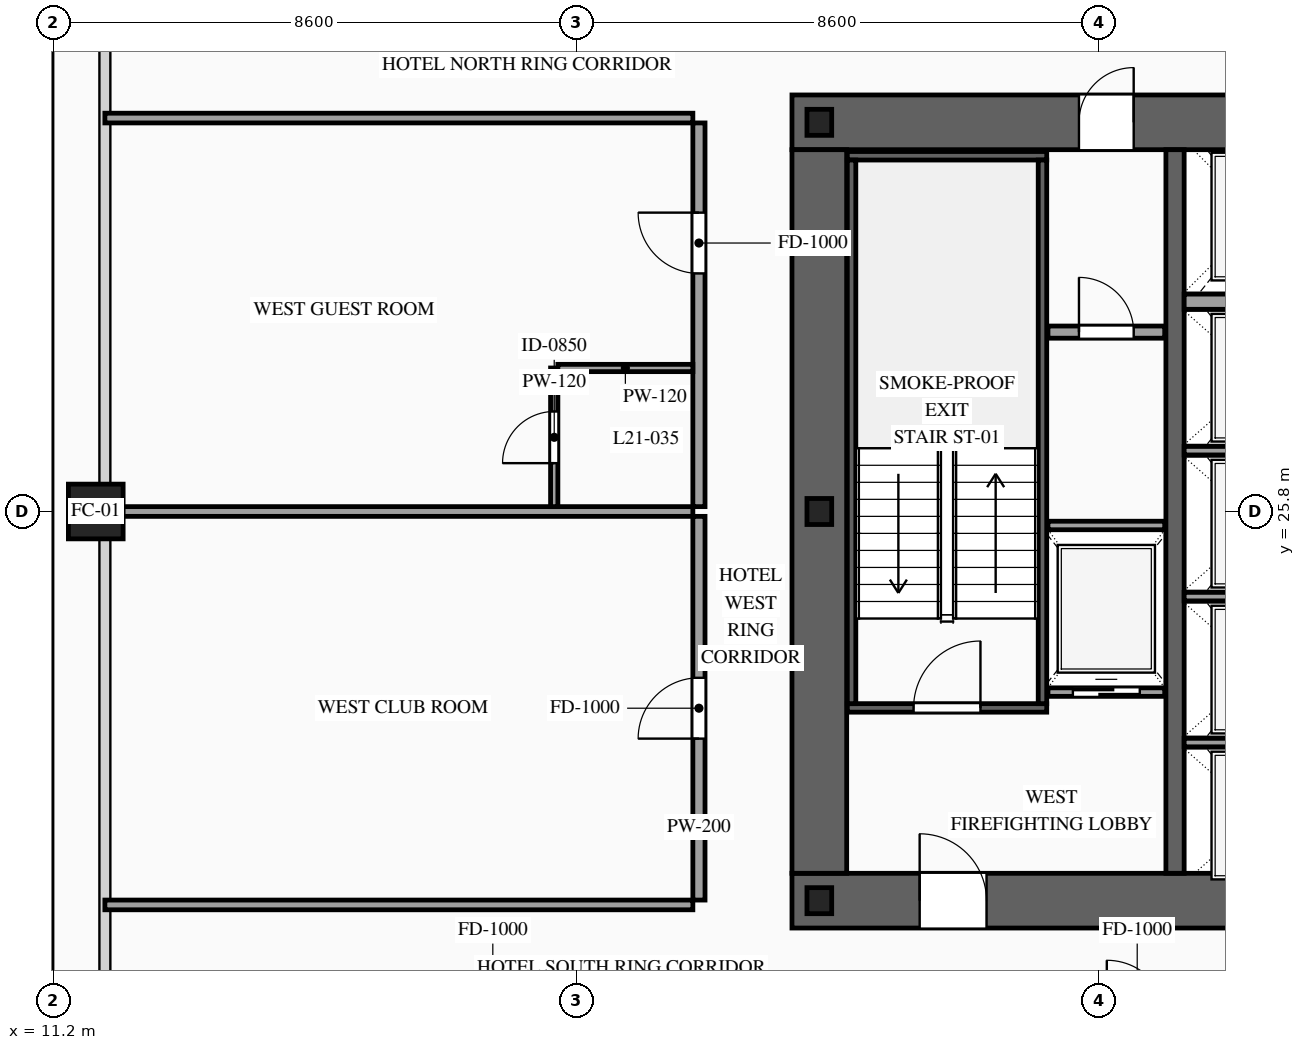
"""IFC4 building model, lengths in metres.
Left out: names, types, materials, properties, quantities, classifications, styles, units other than length and angle.
Written with IfcOpenShell. Run it as: python <this file> out.ifc"""

import sys

from ifc_helpers import new_model, si_unit, direction, frame, frame_2d, origin, origin_2d, place, context, subcontext, project, spatial, rectangle, hollow_rectangle, i_section, extrude, source, transform, mapped, element, fill, save


model = new_model("IFC4")
c1 = context("Model", 3, precision=1e-05, world=origin(), true_north=direction((0.0, 1.0)))
c2 = subcontext(c1, "Body", "Model", "MODEL_VIEW")
j1 = project(units=[si_unit("LENGTHUNIT", "METRE"), si_unit("PLANEANGLEUNIT", "RADIAN")], contexts=[c1])
p1 = place(None, origin())
s1 = spatial("IfcSite", under=j1, at=p1, CompositionType="ELEMENT")
p2 = place(p1, origin())
s2 = spatial("IfcBuilding", under=s1, at=p2, CompositionType="ELEMENT")
p3 = place(p2, frame((0.0, 0.0, 82.0)))
s3 = spatial("IfcBuildingStorey", under=s2, at=p3, CompositionType="ELEMENT", Elevation=82.0)
p4 = place(p3, frame((23.35, 19.4, 0.0), z_axis=(0.0, 0.0, 1.0), x_axis=(1.0, 0.0, 0.0)))
e1 = element("IfcWall", 1, at=p4, inside=s3, PredefinedType="SHEAR", context=c2, shape_type="SweptSolid", body=[
    extrude(rectangle(XDim=27.3, YDim=0.9, at=frame_2d((13.65, 0.0))), origin(), (0.0, 0.0, 1.0), 3.6),
])
p5 = place(p4, frame((2.1, 0.0, 0.0)))
e2 = element("IfcOpeningElement", 2, at=p5, cuts=e1, PredefinedType="OPENING", context=c2, shape_type="SweptSolid", body=[
    extrude(rectangle(XDim=1.1, YDim=2.2, at=frame_2d((0.55, 1.1))), frame((0.0, 0.465, 0.0), z_axis=(0.0, -1.0, 0.0), x_axis=(1.0, 0.0, 0.0)), (0.0, 0.0, 1.0), 0.93),
])
p6 = place(p4, frame((10.0, 0.0, 0.0)))
e3 = element("IfcOpeningElement", 3, at=p6, cuts=e1, PredefinedType="OPENING", context=c2, shape_type="SweptSolid", body=[
    extrude(rectangle(XDim=1.1, YDim=2.2, at=frame_2d((0.55, 1.1))), frame((0.0, 0.465, 0.0), z_axis=(0.0, -1.0, 0.0), x_axis=(1.0, 0.0, 0.0)), (0.0, 0.0, 1.0), 0.93),
])
p7 = place(p4, frame((23.2, 0.0, 0.0)))
e4 = element("IfcOpeningElement", 4, at=p7, cuts=e1, PredefinedType="OPENING", context=c2, shape_type="SweptSolid", body=[
    extrude(rectangle(XDim=1.1, YDim=2.2, at=frame_2d((0.55, 1.1))), frame((0.0, 0.465, 0.0), z_axis=(0.0, -1.0, 0.0), x_axis=(1.0, 0.0, 0.0)), (0.0, 0.0, 1.0), 0.93),
])
p8 = place(p4, frame((19.82, 0.0, 0.0)))
e5 = element("IfcOpeningElement", 5, at=p8, cuts=e1, PredefinedType="OPENING", context=c2, shape_type="SweptSolid", body=[
    extrude(rectangle(XDim=0.9, YDim=2.15, at=frame_2d((0.45, 1.075))), frame((0.0, 0.465, 0.0), z_axis=(0.0, -1.0, 0.0), x_axis=(1.0, 0.0, 0.0)), (0.0, 0.0, 1.0), 0.93),
])
p9 = place(p4, frame((18.38, 0.0, 0.0)))
e6 = element("IfcOpeningElement", 6, at=p9, cuts=e1, PredefinedType="OPENING", context=c2, shape_type="SweptSolid", body=[
    extrude(rectangle(XDim=0.9, YDim=2.15, at=frame_2d((0.45, 1.075))), frame((0.0, 0.465, 0.0), z_axis=(0.0, -1.0, 0.0), x_axis=(1.0, 0.0, 0.0)), (0.0, 0.0, 1.0), 0.93),
])
p10 = place(p3, frame((23.35, 32.2, 0.0), z_axis=(0.0, 0.0, 1.0), x_axis=(1.0, 0.0, 0.0)))
e7 = element("IfcWall", 7, at=p10, inside=s3, PredefinedType="SHEAR", context=c2, shape_type="SweptSolid", body=[
    extrude(rectangle(XDim=27.3, YDim=0.9, at=frame_2d((13.65, 0.0))), origin(), (0.0, 0.0, 1.0), 3.6),
])
p11 = place(p10, frame((4.72, 0.0, 0.0)))
e8 = element("IfcOpeningElement", 8, at=p11, cuts=e7, PredefinedType="OPENING", context=c2, shape_type="SweptSolid", body=[
    extrude(rectangle(XDim=0.9, YDim=2.15, at=frame_2d((0.45, 1.075))), frame((0.0, 0.465, 0.0), z_axis=(0.0, -1.0, 0.0), x_axis=(1.0, 0.0, 0.0)), (0.0, 0.0, 1.0), 0.93),
])
p12 = place(p10, frame((10.0, 0.0, 0.0)))
e9 = element("IfcOpeningElement", 9, at=p12, cuts=e7, PredefinedType="OPENING", context=c2, shape_type="SweptSolid", body=[
    extrude(rectangle(XDim=1.1, YDim=2.2, at=frame_2d((0.55, 1.1))), frame((0.0, 0.465, 0.0), z_axis=(0.0, -1.0, 0.0), x_axis=(1.0, 0.0, 0.0)), (0.0, 0.0, 1.0), 0.93),
])
p13 = place(p10, frame((15.85, 0.0, 0.0)))
e10 = element("IfcOpeningElement", 10, at=p13, cuts=e7, PredefinedType="OPENING", context=c2, shape_type="SweptSolid", body=[
    extrude(rectangle(XDim=1.1, YDim=2.2, at=frame_2d((0.55, 1.1))), frame((0.0, 0.465, 0.0), z_axis=(0.0, -1.0, 0.0), x_axis=(1.0, 0.0, 0.0)), (0.0, 0.0, 1.0), 0.93),
])
m1 = source(origin(), c2, "Body", "SweptSolid", [
    extrude(rectangle(XDim=11.9, YDim=0.9, at=frame_2d((5.95, 0.0))), origin(), (0.0, 0.0, 1.0), 3.6),
])
p14 = place(p3, frame((23.8, 19.85, 0.0), z_axis=(0.0, 0.0, 1.0), x_axis=(0.0, 1.0, 0.0)))
e11 = element("IfcWall", 11, at=p14, inside=s3, PredefinedType="SHEAR", context=c2, shape_type="MappedRepresentation", body=[
    mapped(m1, transform((0.0, 0.0, 0.0), scale=1.0)),
])
m2 = source(origin(), c2, "Body", "SweptSolid", [
    extrude(rectangle(XDim=11.9, YDim=0.3, at=frame_2d((5.95, 0.0))), origin(), (0.0, 0.0, 1.0), 3.6),
])
p15 = place(p3, frame((29.65, 19.85, 0.0), z_axis=(0.0, 0.0, 1.0), x_axis=(0.0, 1.0, 0.0)))
e12 = element("IfcWall", 12, at=p15, inside=s3, PredefinedType="SOLIDWALL", context=c2, shape_type="MappedRepresentation", body=[
    mapped(m2, transform((0.0, 0.0, 0.0), scale=1.0)),
])
m3 = source(origin(), c2, "Body", "SweptSolid", [
    extrude(i_section(OverallWidth=0.407, OverallDepth=0.428, WebThickness=0.02, FlangeThickness=0.035, at=origin_2d()), origin(), (0.0, 0.0, 1.0), 3.6),
])
for number, where, z_axis, x_axis in (
    (13, (23.8, 19.4, 0.0), (0.0, 0.0, 1.0), (1.0, 0.0, 0.0)),
    (14, (23.8, 25.8, 0.0), (0.0, 0.0, 1.0), (1.0, 0.0, 0.0)),
    (15, (23.8, 32.2, 0.0), (0.0, 0.0, 1.0), (1.0, 0.0, 0.0)),
):
    element("IfcColumn", number, at=place(p3, frame(where, z_axis=z_axis, x_axis=x_axis)), inside=s3, PredefinedType="COLUMN", context=c2, shape_type="MappedRepresentation", body=[
        mapped(m3, transform((0.0, 0.0, 0.0), scale=1.0)),
    ])
m4 = source(origin(), c2, "Body", "SweptSolid", [
    extrude(hollow_rectangle(XDim=0.9, YDim=0.9, WallThickness=0.042, at=origin_2d()), origin(), (0.0, 0.0, 1.0), 3.32),
])
p16 = place(p3, frame((11.9, 25.8, 0.0), z_axis=(0.0, 0.0, 1.0), x_axis=(1.0, 0.0, 0.0)))
e16 = element("IfcColumn", 16, at=p16, inside=s3, PredefinedType="COLUMN", context=c2, shape_type="MappedRepresentation", body=[
    mapped(m4, transform((0.0, 0.0, 0.0), scale=1.0)),
])
p17 = place(p3, frame((27.56, 22.83, 0.0), z_axis=(0.0, 0.0, 1.0), x_axis=(1.0, 0.0, 0.0)))
e17 = element("IfcWall", 17, at=p17, inside=s3, PredefinedType="SOLIDWALL", context=c2, shape_type="SweptSolid", body=[
    extrude(rectangle(XDim=1.92, YDim=0.14, at=frame_2d((0.96, 0.0))), origin(), (0.0, 0.0, 1.0), 3.32),
])
p18 = place(p17, frame((0.41, 0.0, 0.0)))
e18 = element("IfcOpeningElement", 18, at=p18, cuts=e17, PredefinedType="OPENING", context=c2, shape_type="SweptSolid", body=[
    extrude(rectangle(XDim=1.1, YDim=2.2, at=frame_2d((0.55, 1.1))), frame((0.0, 0.085, 0.0), z_axis=(0.0, -1.0, 0.0), x_axis=(1.0, 0.0, 0.0)), (0.0, 0.0, 1.0), 0.17),
])
m5 = source(origin(), c2, "Body", "SweptSolid", [
    extrude(rectangle(XDim=1.92, YDim=0.14, at=frame_2d((0.96, 0.0))), origin(), (0.0, 0.0, 1.0), 3.32),
])
p19 = place(p3, frame((27.56, 25.57, 0.0), z_axis=(0.0, 0.0, 1.0), x_axis=(1.0, 0.0, 0.0)))
e19 = element("IfcWall", 19, at=p19, inside=s3, PredefinedType="SOLIDWALL", context=c2, shape_type="MappedRepresentation", body=[
    mapped(m5, transform((0.0, 0.0, 0.0), scale=1.0)),
])
m6 = source(origin(), c2, "Body", "SweptSolid", [
    extrude(rectangle(XDim=2.5, YDim=0.14, at=frame_2d((1.25, 0.0))), origin(), (0.0, 0.0, 1.0), 3.32),
])
for number, where, z_axis, x_axis in (
    (20, (29.8, 22.0, 0.0), (0.0, 0.0, 1.0), (1.0, 0.0, 0.0)),
    (21, (29.8, 24.4, 0.0), (0.0, 0.0, 1.0), (1.0, 0.0, 0.0)),
    (22, (29.8, 26.8, 0.0), (0.0, 0.0, 1.0), (1.0, 0.0, 0.0)),
):
    element("IfcWall", number, at=place(p3, frame(where, z_axis=z_axis, x_axis=x_axis)), inside=s3, PredefinedType="SOLIDWALL", context=c2, shape_type="MappedRepresentation", body=[
        mapped(m6, transform((0.0, 0.0, 0.0), scale=1.0)),
    ])
m7 = source(origin(), c2, "Body", "SweptSolid", [
    extrude(rectangle(XDim=2.5, YDim=0.25, at=frame_2d((1.25, 0.0))), origin(), (0.0, 0.0, 1.0), 3.32),
])
p20 = place(p3, frame((29.8, 29.25, 0.0), z_axis=(0.0, 0.0, 1.0), x_axis=(1.0, 0.0, 0.0)))
e23 = element("IfcWall", 23, at=p20, inside=s3, PredefinedType="SOLIDWALL", context=c2, shape_type="MappedRepresentation", body=[
    mapped(m7, transform((0.0, 0.0, 0.0), scale=1.0)),
])
p21 = place(p3, frame((24.26, 22.57, 0.0), z_axis=(0.0, 0.0, 1.0), x_axis=(1.0, 0.0, 0.0)))
e24 = element("IfcWall", 24, at=p21, inside=s3, PredefinedType="SOLIDWALL", context=c2, shape_type="SweptSolid", body=[
    extrude(rectangle(XDim=3.28, YDim=0.14, at=frame_2d((1.64, 0.0))), origin(), (0.0, 0.0, 1.0), 3.32),
])
p22 = place(p21, frame((1.09, 0.0, 0.0)))
e25 = element("IfcOpeningElement", 25, at=p22, cuts=e24, PredefinedType="OPENING", context=c2, shape_type="SweptSolid", body=[
    extrude(rectangle(XDim=1.1, YDim=2.2, at=frame_2d((0.55, 1.1))), frame((0.0, 0.085, 0.0), z_axis=(0.0, -1.0, 0.0), x_axis=(1.0, 0.0, 0.0)), (0.0, 0.0, 1.0), 0.17),
])
m8 = source(origin(), c2, "Body", "SweptSolid", [
    extrude(rectangle(XDim=3.28, YDim=0.14, at=frame_2d((1.64, 0.0))), origin(), (0.0, 0.0, 1.0), 3.32),
])
p23 = place(p3, frame((24.26, 31.65, 0.0), z_axis=(0.0, 0.0, 1.0), x_axis=(1.0, 0.0, 0.0)))
e26 = element("IfcWall", 26, at=p23, inside=s3, PredefinedType="SOLIDWALL", context=c2, shape_type="MappedRepresentation", body=[
    mapped(m8, transform((0.0, 0.0, 0.0), scale=1.0)),
])
m9 = source(origin(), c2, "Body", "SweptSolid", [
    extrude(rectangle(XDim=8.94, YDim=0.14, at=frame_2d((4.47, 0.0))), origin(), (0.0, 0.0, 1.0), 3.32),
])
for number, where, z_axis, x_axis in (
    (27, (24.33, 22.64, 0.0), (0.0, 0.0, 1.0), (0.0, 1.0, 0.0)),
    (28, (27.47, 22.64, 0.0), (0.0, 0.0, 1.0), (0.0, 1.0, 0.0)),
):
    element("IfcWall", number, at=place(p3, frame(where, z_axis=z_axis, x_axis=x_axis)), inside=s3, PredefinedType="SOLIDWALL", context=c2, shape_type="MappedRepresentation", body=[
        mapped(m9, transform((0.0, 0.0, 0.0), scale=1.0)),
    ])
p24 = place(p3, frame((27.56, 28.75, 0.0), z_axis=(0.0, 0.0, 1.0), x_axis=(1.0, 0.0, 0.0)))
e29 = element("IfcWall", 29, at=p24, inside=s3, PredefinedType="PARTITIONING", context=c2, shape_type="SweptSolid", body=[
    extrude(rectangle(XDim=1.92, YDim=0.2, at=frame_2d((0.96, 0.0))), origin(), (0.0, 0.0, 1.0), 3.32),
])
p25 = place(p24, frame((0.51, 0.0, 0.0)))
e30 = element("IfcOpeningElement", 30, at=p25, cuts=e29, PredefinedType="OPENING", context=c2, shape_type="SweptSolid", body=[
    extrude(rectangle(XDim=0.9, YDim=2.15, at=frame_2d((0.45, 1.075))), frame((0.0, 0.115, 0.0), z_axis=(0.0, -1.0, 0.0), x_axis=(1.0, 0.0, 0.0)), (0.0, 0.0, 1.0), 0.23),
])
p26 = place(p3, frame((21.82, 19.41, 0.0), z_axis=(0.0, 0.0, 1.0), x_axis=(0.0, 1.0, 0.0)))
e31 = element("IfcWall", 31, at=p26, inside=s3, PredefinedType="PARTITIONING", context=c2, shape_type="SweptSolid", body=[
    extrude(rectangle(XDim=6.31, YDim=0.2, at=frame_2d((3.155, 0.0))), origin(), (0.0, 0.0, 1.0), 3.32),
])
p27 = place(p26, frame((2.655, 0.0, 0.0)))
e32 = element("IfcOpeningElement", 32, at=p27, cuts=e31, PredefinedType="OPENING", context=c2, shape_type="SweptSolid", body=[
    extrude(rectangle(XDim=1.0, YDim=2.2, at=frame_2d((0.5, 1.1))), frame((0.0, 0.115, 0.0), z_axis=(0.0, -1.0, 0.0), x_axis=(1.0, 0.0, 0.0)), (0.0, 0.0, 1.0), 0.23),
])
m10 = source(origin(), c2, "Body", "SweptSolid", [
    extrude(rectangle(XDim=9.67, YDim=0.16, at=frame_2d((4.835, 0.0))), origin(), (0.0, 0.0, 1.0), 1.715),
])
p28 = place(p3, frame((12.05, 25.8, 0.0), z_axis=(0.0, 0.0, 1.0), x_axis=(1.0, 0.0, 0.0)))
e33 = element("IfcWall", 33, at=p28, inside=s3, PredefinedType="PARTITIONING", context=c2, shape_type="MappedRepresentation", body=[
    mapped(m10, transform((0.0, 0.0, 0.0), scale=1.0)),
])
m11 = source(origin(), c2, "Body", "SweptSolid", [
    extrude(rectangle(XDim=9.67, YDim=0.16, at=frame_2d((4.835, 0.0))), origin(), (0.0, 0.0, 1.0), 3.32),
])
p29 = place(p3, frame((12.05, 19.33, 0.0), z_axis=(0.0, 0.0, 1.0), x_axis=(1.0, 0.0, 0.0)))
e34 = element("IfcWall", 34, at=p29, inside=s3, PredefinedType="PARTITIONING", context=c2, shape_type="MappedRepresentation", body=[
    mapped(m11, transform((0.0, 0.0, 0.0), scale=1.0)),
])
p30 = place(p3, frame((21.82, 25.88, 0.0), z_axis=(0.0, 0.0, 1.0), x_axis=(0.0, 1.0, 0.0)))
e35 = element("IfcWall", 35, at=p30, inside=s3, PredefinedType="PARTITIONING", context=c2, shape_type="SweptSolid", body=[
    extrude(rectangle(XDim=6.31, YDim=0.2, at=frame_2d((3.155, 0.0))), origin(), (0.0, 0.0, 1.0), 3.32),
])
p31 = place(p30, frame((3.835, 0.0, 0.0)))
e36 = element("IfcOpeningElement", 36, at=p31, cuts=e35, PredefinedType="OPENING", context=c2, shape_type="SweptSolid", body=[
    extrude(rectangle(XDim=1.0, YDim=2.2, at=frame_2d((0.5, 1.1))), frame((0.0, 0.115, 0.0), z_axis=(0.0, -1.0, 0.0), x_axis=(1.0, 0.0, 0.0)), (0.0, 0.0, 1.0), 0.23),
])
p32 = place(p3, frame((12.05, 32.27, 0.0), z_axis=(0.0, 0.0, 1.0), x_axis=(1.0, 0.0, 0.0)))
e37 = element("IfcWall", 37, at=p32, inside=s3, PredefinedType="PARTITIONING", context=c2, shape_type="MappedRepresentation", body=[
    mapped(m11, transform((0.0, 0.0, 0.0), scale=1.0)),
])
p33 = place(p3, frame((19.44, 25.88, 0.0), z_axis=(0.0, 0.0, 1.0), x_axis=(0.0, 1.0, 0.0)))
e38 = element("IfcWall", 38, at=p33, inside=s3, PredefinedType="PARTITIONING", context=c2, shape_type="SweptSolid", body=[
    extrude(rectangle(XDim=2.28, YDim=0.12, at=frame_2d((1.14, 0.0))), origin(), (0.0, 0.0, 1.0), 3.32),
])
p34 = place(p33, frame((0.715, 0.0, 0.0)))
e39 = element("IfcOpeningElement", 39, at=p34, cuts=e38, PredefinedType="OPENING", context=c2, shape_type="SweptSolid", body=[
    extrude(rectangle(XDim=0.85, YDim=2.1, at=frame_2d((0.425, 1.05))), frame((0.0, 0.075, 0.0), z_axis=(0.0, -1.0, 0.0), x_axis=(1.0, 0.0, 0.0)), (0.0, 0.0, 1.0), 0.15),
])
m12 = source(origin(), c2, "Body", "SweptSolid", [
    extrude(rectangle(XDim=2.22, YDim=0.12, at=frame_2d((1.11, 0.0))), origin(), (0.0, 0.0, 1.0), 3.32),
])
p35 = place(p3, frame((19.5, 28.16, 0.0), z_axis=(0.0, 0.0, 1.0), x_axis=(1.0, 0.0, 0.0)))
e40 = element("IfcWall", 40, at=p35, inside=s3, PredefinedType="PARTITIONING", context=c2, shape_type="MappedRepresentation", body=[
    mapped(m12, transform((0.0, 0.0, 0.0), scale=1.0)),
])
m13 = source(origin(), c2, "Body", "SweptSolid", [
    extrude(rectangle(XDim=1.1, YDim=2.2, at=frame_2d((0.55, 1.1))), frame((0.0, 0.025, 0.0), z_axis=(0.0, -1.0, 0.0), x_axis=(1.0, 0.0, 0.0)), (0.0, 0.0, 1.0), 0.05),
])
p36 = place(p18, origin())
e41 = element("IfcDoor", 41, at=p36, inside=s3, OperationType="SLIDING_TO_LEFT", PredefinedType="DOOR", context=c2, shape_type="MappedRepresentation", body=[
    mapped(m13, transform((0.0, 0.0, 0.0), scale=1.0)),
])
fill(e18, e41)
m14 = source(origin(), c2, "Body", "SweptSolid", [
    extrude(rectangle(XDim=1.1, YDim=2.2, at=frame_2d((0.55, 1.1))), frame((0.0, 0.025, 0.0), z_axis=(0.0, -1.0, 0.0), x_axis=(1.0, 0.0, 0.0)), (0.0, 0.0, 1.0), 0.05),
])
p37 = place(p22, origin())
e42 = element("IfcDoor", 42, at=p37, inside=s3, OperationType="SINGLE_SWING_RIGHT", PredefinedType="DOOR", context=c2, shape_type="MappedRepresentation", body=[
    mapped(m14, transform((0.0, 0.0, 0.0), scale=1.0)),
])
fill(e25, e42)
p38 = place(p5, origin())
e43 = element("IfcDoor", 43, at=p38, inside=s3, OperationType="SINGLE_SWING_LEFT", PredefinedType="DOOR", context=c2, shape_type="MappedRepresentation", body=[
    mapped(m14, transform((0.0, 0.0, 0.0), scale=1.0)),
])
fill(e2, e43)
m15 = source(origin(), c2, "Body", "SweptSolid", [
    extrude(rectangle(XDim=0.9, YDim=2.15, at=frame_2d((0.45, 1.075))), frame((0.0, 0.025, 0.0), z_axis=(0.0, -1.0, 0.0), x_axis=(1.0, 0.0, 0.0)), (0.0, 0.0, 1.0), 0.05),
])
p39 = place(p11, origin())
e44 = element("IfcDoor", 44, at=p39, inside=s3, OperationType="SINGLE_SWING_RIGHT", PredefinedType="DOOR", context=c2, shape_type="MappedRepresentation", body=[
    mapped(m15, transform((0.0, 0.0, 0.0), scale=1.0)),
])
fill(e8, e44)
p40 = place(p25, origin())
e45 = element("IfcDoor", 45, at=p40, inside=s3, OperationType="SINGLE_SWING_LEFT", PredefinedType="DOOR", context=c2, shape_type="MappedRepresentation", body=[
    mapped(m15, transform((0.0, 0.0, 0.0), scale=1.0)),
])
fill(e30, e45)
m16 = source(origin(), c2, "Body", "SweptSolid", [
    extrude(rectangle(XDim=1.0, YDim=2.2, at=frame_2d((0.5, 1.1))), frame((0.0, 0.025, 0.0), z_axis=(0.0, -1.0, 0.0), x_axis=(1.0, 0.0, 0.0)), (0.0, 0.0, 1.0), 0.05),
])
p41 = place(p27, origin())
e46 = element("IfcDoor", 46, at=p41, inside=s3, OperationType="SINGLE_SWING_LEFT", PredefinedType="DOOR", context=c2, shape_type="MappedRepresentation", body=[
    mapped(m16, transform((0.0, 0.0, 0.0), scale=1.0)),
])
fill(e32, e46)
p42 = place(p31, origin())
e47 = element("IfcDoor", 47, at=p42, inside=s3, OperationType="SINGLE_SWING_RIGHT", PredefinedType="DOOR", context=c2, shape_type="MappedRepresentation", body=[
    mapped(m16, transform((0.0, 0.0, 0.0), scale=1.0)),
])
fill(e36, e47)
m17 = source(origin(), c2, "Body", "SweptSolid", [
    extrude(rectangle(XDim=0.85, YDim=2.1, at=frame_2d((0.425, 1.05))), frame((0.0, 0.025, 0.0), z_axis=(0.0, -1.0, 0.0), x_axis=(1.0, 0.0, 0.0)), (0.0, 0.0, 1.0), 0.05),
])
p43 = place(p34, origin())
e48 = element("IfcDoor", 48, at=p43, inside=s3, OperationType="SINGLE_SWING_LEFT", PredefinedType="DOOR", context=c2, shape_type="MappedRepresentation", body=[
    mapped(m17, transform((0.0, 0.0, 0.0), scale=1.0)),
])
fill(e39, e48)
save(model, sys.argv[1])
